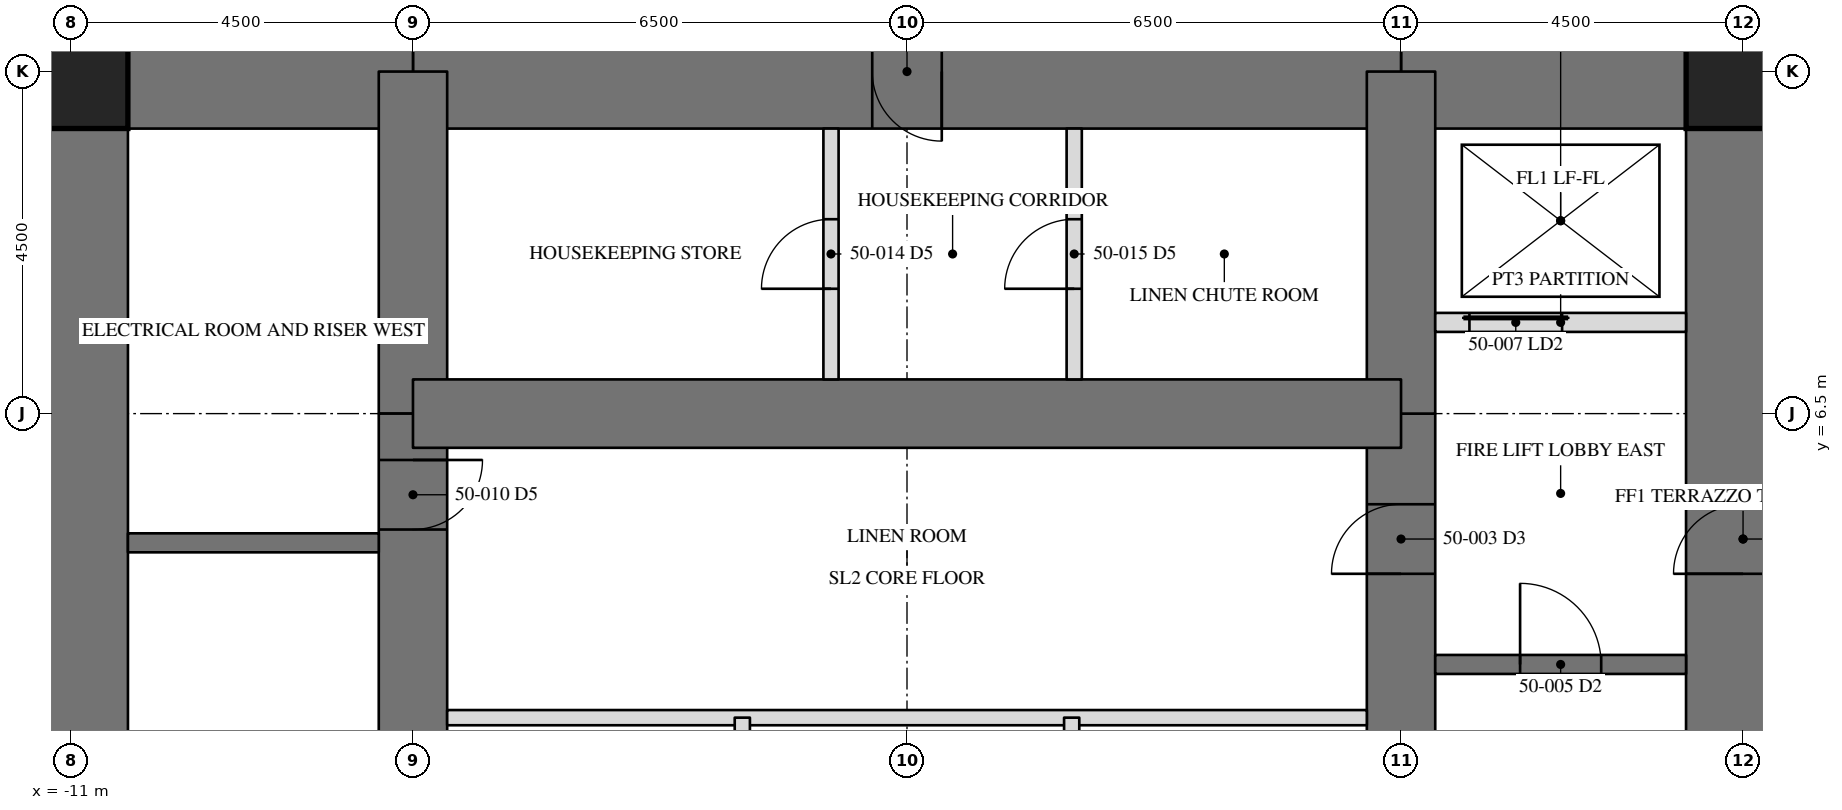
"""IFC4 building model, lengths in metres.
Left out: names, types, materials, properties, quantities, classifications, styles, units other than length and angle.
Written with IfcOpenShell. Run it as: python <this file> out.ifc"""

import sys

from ifc_helpers import new_model, si_unit, direction, frame, frame_2d, origin, origin_2d, place, context, subcontext, project, spatial, rectangle, hollow_rectangle, extrude, element, fill, save


model = new_model("IFC4")
c1 = context("Model", 3, precision=1e-05, world=origin(), true_north=direction((0.0, 1.0)))
c2 = subcontext(c1, "Body", "Model", "MODEL_VIEW")
j1 = project(units=[si_unit("LENGTHUNIT", "METRE"), si_unit("PLANEANGLEUNIT", "RADIAN")], contexts=[c1])
p1 = place(None, origin())
s1 = spatial("IfcSite", under=j1, at=p1, CompositionType="ELEMENT")
p2 = place(p1, origin())
s2 = spatial("IfcBuilding", under=s1, at=p2, CompositionType="ELEMENT")
p3 = place(p2, frame((0.0, 0.0, 211.7)))
s3 = spatial("IfcBuildingStorey", under=s2, at=p3, CompositionType="ELEMENT", Elevation=211.7)
p4 = place(p3, frame((11.0, -11.0, 0.0), z_axis=(0.0, 0.0, 1.0), x_axis=(0.0, 1.0, 0.0)))
e1 = element("IfcWall", 1, at=p4, inside=s3, PredefinedType="SHEAR", context=c2, shape_type="SweptSolid", body=[
    extrude(rectangle(XDim=22.0, YDim=1.5, at=frame_2d((11.0, 0.0))), origin(), (0.0, 0.0, 1.0), 3.5),
])
p5 = place(p4, frame((15.393, 0.0, 0.0)))
e2 = element("IfcOpeningElement", 2, at=p5, cuts=e1, PredefinedType="OPENING", context=c2, shape_type="SweptSolid", body=[
    extrude(rectangle(XDim=0.915, YDim=2.134, at=frame_2d((0.458, 1.067))), frame((0.0, 0.76, 0.0), z_axis=(0.0, -1.0, 0.0), x_axis=(1.0, 0.0, 0.0)), (0.0, 0.0, 1.0), 1.52),
])
p6 = place(p3, frame((-11.0, 11.0, 0.0), z_axis=(0.0, 0.0, 1.0), x_axis=(0.0, -1.0, 0.0)))
e3 = element("IfcWall", 3, at=p6, inside=s3, PredefinedType="SHEAR", context=c2, shape_type="SweptSolid", body=[
    extrude(rectangle(XDim=22.0, YDim=1.5, at=frame_2d((11.0, 0.0))), origin(), (0.0, 0.0, 1.0), 3.5),
])
p7 = place(p6, frame((15.393, 0.0, 0.0)))
e4 = element("IfcOpeningElement", 4, at=p7, cuts=e3, PredefinedType="OPENING", context=c2, shape_type="SweptSolid", body=[
    extrude(rectangle(XDim=0.915, YDim=2.134, at=frame_2d((0.458, 1.067))), frame((0.0, 0.76, 0.0), z_axis=(0.0, -1.0, 0.0), x_axis=(1.0, 0.0, 0.0)), (0.0, 0.0, 1.0), 1.52),
])
p8 = place(p3, frame((11.0, 11.0, 0.0), z_axis=(0.0, 0.0, 1.0), x_axis=(-1.0, 0.0, 0.0)))
e5 = element("IfcWall", 5, at=p8, inside=s3, PredefinedType="SHEAR", context=c2, shape_type="SweptSolid", body=[
    extrude(rectangle(XDim=4.5, YDim=1.5, at=frame_2d((2.25, 0.0))), origin(), (0.0, 0.0, 1.0), 3.5),
])
p9 = place(p3, frame((6.5, 11.0, 0.0), z_axis=(0.0, 0.0, 1.0), x_axis=(-1.0, 0.0, 0.0)))
e6 = element("IfcWall", 6, at=p9, inside=s3, PredefinedType="SHEAR", context=c2, shape_type="SweptSolid", body=[
    extrude(rectangle(XDim=13.0, YDim=1.5, at=frame_2d((6.5, 0.0))), origin(), (0.0, 0.0, 1.0), 3.5),
])
p10 = place(p9, frame((6.042, 0.0, 0.0)))
e7 = element("IfcOpeningElement", 7, at=p10, cuts=e6, PredefinedType="OPENING", context=c2, shape_type="SweptSolid", body=[
    extrude(rectangle(XDim=0.915, YDim=2.134, at=frame_2d((0.458, 1.067))), frame((0.0, 0.76, 0.0), z_axis=(0.0, -1.0, 0.0), x_axis=(1.0, 0.0, 0.0)), (0.0, 0.0, 1.0), 1.52),
])
p11 = place(p3, frame((-6.5, 11.0, 0.0), z_axis=(0.0, 0.0, 1.0), x_axis=(-1.0, 0.0, 0.0)))
e8 = element("IfcWall", 8, at=p11, inside=s3, PredefinedType="SHEAR", context=c2, shape_type="SweptSolid", body=[
    extrude(rectangle(XDim=4.5, YDim=1.5, at=frame_2d((2.25, 0.0))), origin(), (0.0, 0.0, 1.0), 3.5),
])
p12 = place(p3, frame((6.5, -6.5, 0.0), z_axis=(0.0, 0.0, 1.0), x_axis=(0.0, 1.0, 0.0)))
e9 = element("IfcWall", 9, at=p12, inside=s3, PredefinedType="SHEAR", context=c2, shape_type="SweptSolid", body=[
    extrude(rectangle(XDim=13.0, YDim=0.9, at=frame_2d((6.5, 0.0))), origin(), (0.0, 0.0, 1.0), 3.5),
])
p13 = place(p12, frame((10.893, 0.0, 0.0)))
e10 = element("IfcOpeningElement", 10, at=p13, cuts=e9, PredefinedType="OPENING", context=c2, shape_type="SweptSolid", body=[
    extrude(rectangle(XDim=0.915, YDim=2.134, at=frame_2d((0.458, 1.067))), frame((0.0, 0.46, 0.0), z_axis=(0.0, -1.0, 0.0), x_axis=(1.0, 0.0, 0.0)), (0.0, 0.0, 1.0), 0.92),
])
p14 = place(p12, frame((0.61, 0.0, 0.0)))
e11 = element("IfcOpeningElement", 11, at=p14, cuts=e9, PredefinedType="OPENING", context=c2, shape_type="SweptSolid", body=[
    extrude(rectangle(XDim=0.915, YDim=2.134, at=frame_2d((0.458, 1.067))), frame((0.0, 0.46, 0.0), z_axis=(0.0, -1.0, 0.0), x_axis=(1.0, 0.0, 0.0)), (0.0, 0.0, 1.0), 0.92),
])
for number, where, z_axis, x_axis in (
    (12, (6.5, 6.5, 0.0), (0.0, 0.0, 1.0), (0.0, 1.0, 0.0)),
    (13, (-6.5, 11.0, 0.0), (0.0, 0.0, 1.0), (0.0, -1.0, 0.0)),
):
    element("IfcWall", number, at=place(p3, frame(where, z_axis=z_axis, x_axis=x_axis)), inside=s3, PredefinedType="SHEAR", context=c2, shape_type="SweptSolid", body=[
        extrude(rectangle(XDim=4.5, YDim=0.9, at=frame_2d((2.25, 0.0))), origin(), (0.0, 0.0, 1.0), 3.5),
    ])
p15 = place(p3, frame((-6.5, 6.5, 0.0), z_axis=(0.0, 0.0, 1.0), x_axis=(0.0, -1.0, 0.0)))
e14 = element("IfcWall", 14, at=p15, inside=s3, PredefinedType="SHEAR", context=c2, shape_type="SweptSolid", body=[
    extrude(rectangle(XDim=13.0, YDim=0.9, at=frame_2d((6.5, 0.0))), origin(), (0.0, 0.0, 1.0), 3.5),
])
p16 = place(p15, frame((10.893, 0.0, 0.0)))
e15 = element("IfcOpeningElement", 15, at=p16, cuts=e14, PredefinedType="OPENING", context=c2, shape_type="SweptSolid", body=[
    extrude(rectangle(XDim=0.915, YDim=2.134, at=frame_2d((0.458, 1.067))), frame((0.0, 0.46, 0.0), z_axis=(0.0, -1.0, 0.0), x_axis=(1.0, 0.0, 0.0)), (0.0, 0.0, 1.0), 0.92),
])
p17 = place(p15, frame((0.61, 0.0, 0.0)))
e16 = element("IfcOpeningElement", 16, at=p17, cuts=e14, PredefinedType="OPENING", context=c2, shape_type="SweptSolid", body=[
    extrude(rectangle(XDim=0.915, YDim=2.134, at=frame_2d((0.458, 1.067))), frame((0.0, 0.46, 0.0), z_axis=(0.0, -1.0, 0.0), x_axis=(1.0, 0.0, 0.0)), (0.0, 0.0, 1.0), 0.92),
])
p18 = place(p3, frame((6.5, 6.5, 0.0), z_axis=(0.0, 0.0, 1.0), x_axis=(-1.0, 0.0, 0.0)))
e17 = element("IfcWall", 17, at=p18, inside=s3, PredefinedType="SHEAR", context=c2, shape_type="SweptSolid", body=[
    extrude(rectangle(XDim=13.0, YDim=0.9, at=frame_2d((6.5, 0.0))), origin(), (0.0, 0.0, 1.0), 3.5),
])
for number, where, z_axis, x_axis in (
    (18, (11.0, 11.0, 0.0), (0.0, 0.0, 1.0), (1.0, 0.0, 0.0)),
    (19, (-11.0, 11.0, 0.0), (0.0, 0.0, 1.0), (1.0, 0.0, 0.0)),
):
    element("IfcColumn", number, at=place(p3, frame(where, z_axis=z_axis, x_axis=x_axis)), inside=s3, PredefinedType="COLUMN", context=c2, shape_type="SweptSolid", body=[
        extrude(hollow_rectangle(XDim=1.499, YDim=1.499, WallThickness=0.102, at=origin_2d()), origin(), (0.0, 0.0, 1.0), 3.5),
    ])
p19 = place(p3, frame((-6.95, 4.8, 0.0), z_axis=(0.0, 0.0, 1.0), x_axis=(-1.0, 0.0, 0.0)))
e20 = element("IfcWall", 20, at=p19, inside=s3, PredefinedType="SOLIDWALL", context=c2, shape_type="SweptSolid", body=[
    extrude(rectangle(XDim=3.3, YDim=0.25, at=frame_2d((1.65, 0.0))), origin(), (0.0, 0.0, 1.0), 3.31),
])
p20 = place(p3, frame((6.95, 3.2, 0.0), z_axis=(0.0, 0.0, 1.0), x_axis=(1.0, 0.0, 0.0)))
e21 = element("IfcWall", 21, at=p20, inside=s3, PredefinedType="SOLIDWALL", context=c2, shape_type="SweptSolid", body=[
    extrude(rectangle(XDim=3.3, YDim=0.25, at=frame_2d((1.65, 0.0))), origin(), (0.0, 0.0, 1.0), 3.31),
])
p21 = place(p20, frame((1.116, 0.0, 0.0)))
e22 = element("IfcOpeningElement", 22, at=p21, cuts=e21, PredefinedType="OPENING", context=c2, shape_type="SweptSolid", body=[
    extrude(rectangle(XDim=1.067, YDim=2.134, at=frame_2d((0.533, 1.067))), frame((0.0, 0.135, 0.0), z_axis=(0.0, -1.0, 0.0), x_axis=(1.0, 0.0, 0.0)), (0.0, 0.0, 1.0), 0.27),
])
p22 = place(p3, frame((6.95, 7.7, 0.0), z_axis=(0.0, 0.0, 1.0), x_axis=(1.0, 0.0, 0.0)))
e23 = element("IfcWall", 23, at=p22, inside=s3, PredefinedType="PARTITIONING", context=c2, shape_type="SweptSolid", body=[
    extrude(rectangle(XDim=3.3, YDim=0.25, at=frame_2d((1.65, 0.0))), origin(), (0.0, 0.0, 1.0), 3.31),
])
p23 = place(p22, frame((0.45, 0.0, 0.0)))
e24 = element("IfcOpeningElement", 24, at=p23, cuts=e23, PredefinedType="OPENING", context=c2, shape_type="SweptSolid", body=[
    extrude(rectangle(XDim=1.219, YDim=2.134, at=frame_2d((0.609, 1.067))), frame((0.0, 0.135, 0.0), z_axis=(0.0, -1.0, 0.0), x_axis=(1.0, 0.0, 0.0)), (0.0, 0.0, 1.0), 0.27),
])
p24 = place(p3, frame((-6.05, 2.5, 0.0), z_axis=(0.0, 0.0, 1.0), x_axis=(1.0, 0.0, 0.0)))
e25 = element("IfcWall", 25, at=p24, inside=s3, PredefinedType="PARTITIONING", context=c2, shape_type="SweptSolid", body=[
    extrude(rectangle(XDim=12.1, YDim=0.2, at=frame_2d((6.05, 0.0))), origin(), (0.0, 0.0, 1.0), 3.31),
])
for number, where, z_axis, x_axis in (
    (26, (-2.167, -2.5, 0.0), (0.0, 0.0, 1.0), (0.0, 1.0, 0.0)),
    (27, (2.167, -2.5, 0.0), (0.0, 0.0, 1.0), (0.0, 1.0, 0.0)),
):
    element("IfcWall", number, at=place(p3, frame(where, z_axis=z_axis, x_axis=x_axis)), inside=s3, PredefinedType="PARTITIONING", context=c2, shape_type="SweptSolid", body=[
        extrude(rectangle(XDim=5.0, YDim=0.2, at=frame_2d((2.5, 0.0))), origin(), (0.0, 0.0, 1.0), 3.31),
    ])
p25 = place(p3, frame((-1.0, 6.95, 0.0), z_axis=(0.0, 0.0, 1.0), x_axis=(0.0, 1.0, 0.0)))
e28 = element("IfcWall", 28, at=p25, inside=s3, PredefinedType="PARTITIONING", context=c2, shape_type="SweptSolid", body=[
    extrude(rectangle(XDim=3.3, YDim=0.2, at=frame_2d((1.65, 0.0))), origin(), (0.0, 0.0, 1.0), 3.31),
])
p26 = place(p25, frame((1.192, 0.0, 0.0)))
e29 = element("IfcOpeningElement", 29, at=p26, cuts=e28, PredefinedType="OPENING", context=c2, shape_type="SweptSolid", body=[
    extrude(rectangle(XDim=0.915, YDim=2.134, at=frame_2d((0.458, 1.067))), frame((0.0, 0.11, 0.0), z_axis=(0.0, -1.0, 0.0), x_axis=(1.0, 0.0, 0.0)), (0.0, 0.0, 1.0), 0.22),
])
p27 = place(p3, frame((2.2, 6.95, 0.0), z_axis=(0.0, 0.0, 1.0), x_axis=(0.0, 1.0, 0.0)))
e30 = element("IfcWall", 30, at=p27, inside=s3, PredefinedType="PARTITIONING", context=c2, shape_type="SweptSolid", body=[
    extrude(rectangle(XDim=3.3, YDim=0.2, at=frame_2d((1.65, 0.0))), origin(), (0.0, 0.0, 1.0), 3.31),
])
p28 = place(p27, frame((1.192, 0.0, 0.0)))
e31 = element("IfcOpeningElement", 31, at=p28, cuts=e30, PredefinedType="OPENING", context=c2, shape_type="SweptSolid", body=[
    extrude(rectangle(XDim=0.915, YDim=2.134, at=frame_2d((0.458, 1.067))), frame((0.0, 0.11, 0.0), z_axis=(0.0, -1.0, 0.0), x_axis=(1.0, 0.0, 0.0)), (0.0, 0.0, 1.0), 0.22),
])
p29 = place(p13, origin())
e32 = element("IfcDoor", 32, at=p29, inside=s3, OperationType="SINGLE_SWING_RIGHT", PredefinedType="DOOR", context=c2, shape_type="SweptSolid", body=[
    extrude(rectangle(XDim=0.915, YDim=2.134, at=frame_2d((0.458, 1.067))), frame((0.0, -0.375, 0.0), z_axis=(0.0, -1.0, 0.0), x_axis=(1.0, 0.0, 0.0)), (0.0, 0.0, 1.0), 0.05),
])
fill(e10, e32)
p30 = place(p21, origin())
e33 = element("IfcDoor", 33, at=p30, inside=s3, OperationType="SINGLE_SWING_LEFT", PredefinedType="DOOR", context=c2, shape_type="SweptSolid", body=[
    extrude(rectangle(XDim=1.067, YDim=2.134, at=frame_2d((0.533, 1.067))), frame((0.0, 0.025, 0.0), z_axis=(0.0, -1.0, 0.0), x_axis=(1.0, 0.0, 0.0)), (0.0, 0.0, 1.0), 0.05),
])
fill(e22, e33)
p31 = place(p23, origin())
e34 = element("IfcDoor", 34, at=p31, inside=s3, OperationType="SLIDING_TO_LEFT", PredefinedType="DOOR", context=c2, shape_type="SweptSolid", body=[
    extrude(rectangle(XDim=1.219, YDim=2.134, at=frame_2d((0.609, 1.067))), frame((0.0, 0.025, 0.0), z_axis=(0.0, -1.0, 0.0), x_axis=(1.0, 0.0, 0.0)), (0.0, 0.0, 1.0), 0.05),
])
fill(e24, e34)
p32 = place(p17, origin())
e35 = element("IfcDoor", 35, at=p32, inside=s3, OperationType="SINGLE_SWING_RIGHT", PredefinedType="DOOR", context=c2, shape_type="SweptSolid", body=[
    extrude(rectangle(XDim=0.915, YDim=2.134, at=frame_2d((0.458, 1.067))), frame((0.0, -0.375, 0.0), z_axis=(0.0, -1.0, 0.0), x_axis=(1.0, 0.0, 0.0)), (0.0, 0.0, 1.0), 0.05),
])
fill(e16, e35)
p33 = place(p10, origin())
e36 = element("IfcDoor", 36, at=p33, inside=s3, OperationType="SINGLE_SWING_RIGHT", PredefinedType="DOOR", context=c2, shape_type="SweptSolid", body=[
    extrude(rectangle(XDim=0.915, YDim=2.134, at=frame_2d((0.458, 1.067))), frame((0.0, 0.025, 0.0), z_axis=(0.0, -1.0, 0.0), x_axis=(1.0, 0.0, 0.0)), (0.0, 0.0, 1.0), 0.05),
])
fill(e7, e36)
p34 = place(p26, origin())
e37 = element("IfcDoor", 37, at=p34, inside=s3, OperationType="SINGLE_SWING_RIGHT", PredefinedType="DOOR", context=c2, shape_type="SweptSolid", body=[
    extrude(rectangle(XDim=0.915, YDim=2.134, at=frame_2d((0.458, 1.067))), frame((0.0, 0.025, 0.0), z_axis=(0.0, -1.0, 0.0), x_axis=(1.0, 0.0, 0.0)), (0.0, 0.0, 1.0), 0.05),
])
fill(e29, e37)
p35 = place(p28, origin())
e38 = element("IfcDoor", 38, at=p35, inside=s3, OperationType="SINGLE_SWING_RIGHT", PredefinedType="DOOR", context=c2, shape_type="SweptSolid", body=[
    extrude(rectangle(XDim=0.915, YDim=2.134, at=frame_2d((0.458, 1.067))), frame((0.0, 0.025, 0.0), z_axis=(0.0, -1.0, 0.0), x_axis=(1.0, 0.0, 0.0)), (0.0, 0.0, 1.0), 0.05),
])
fill(e31, e38)
save(model, sys.argv[1])
